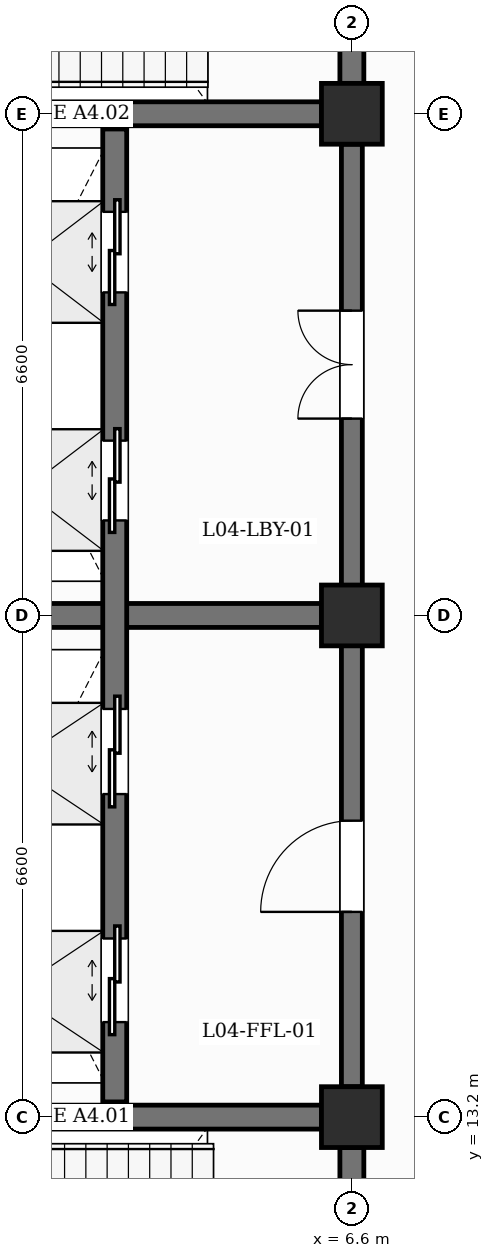
"""IFC4 building model, lengths in metres.
Left out: names, types, materials, properties, quantities, classifications, styles, units other than length and angle.
Written with IfcOpenShell. Run it as: python <this file> out.ifc"""

import sys

from ifc_helpers import new_model, si_unit, direction, frame, frame_2d, origin, origin_2d, place, context, subcontext, project, spatial, rectangle, extrude, element, fill, save


model = new_model("IFC4")
c1 = context("Model", 3, precision=1e-05, world=origin(), true_north=direction((0.0, 1.0)))
c2 = subcontext(c1, "Body", "Model", "MODEL_VIEW")
j1 = project(units=[si_unit("LENGTHUNIT", "METRE"), si_unit("PLANEANGLEUNIT", "RADIAN")], contexts=[c1])
p1 = place(None, origin())
s1 = spatial("IfcSite", under=j1, at=p1, CompositionType="ELEMENT")
p2 = place(p1, origin())
s2 = spatial("IfcBuilding", under=s1, at=p2, CompositionType="ELEMENT")
p3 = place(p2, frame((0.0, 0.0, 18.6)))
s3 = spatial("IfcBuildingStorey", under=s2, at=p3, CompositionType="ELEMENT", Elevation=18.6)
for number, where, z_axis, x_axis in (
    (1, (6.6, 13.2, 0.0), (0.0, 0.0, 1.0), (1.0, 0.0, 0.0)),
    (2, (6.6, 19.8, 0.0), (0.0, 0.0, 1.0), (1.0, 0.0, 0.0)),
    (3, (6.6, 26.4, 0.0), (0.0, 0.0, 1.0), (1.0, 0.0, 0.0)),
):
    element("IfcColumn", number, at=place(p3, frame(where, z_axis=z_axis, x_axis=x_axis)), inside=s3, PredefinedType="COLUMN", context=c2, shape_type="SweptSolid", body=[
        extrude(rectangle(XDim=0.8, YDim=0.8, at=origin_2d()), origin(), (0.0, 0.0, 1.0), 4.2),
    ])
p4 = place(p3, frame((0.4, 13.2, 0.0), z_axis=(0.0, 0.0, 1.0), x_axis=(1.0, 0.0, 0.0)))
e4 = element("IfcWall", 4, at=p4, inside=s3, PredefinedType="SHEAR", context=c2, shape_type="SweptSolid", body=[
    extrude(rectangle(XDim=5.8, YDim=0.315, at=frame_2d((2.9, 0.0))), origin(), (0.0, 0.0, 1.0), 3.16),
])
p5 = place(p3, frame((6.6, 7.0, 0.0), z_axis=(0.0, 0.0, 1.0), x_axis=(0.0, 1.0, 0.0)))
e5 = element("IfcWall", 5, at=p5, inside=s3, PredefinedType="SHEAR", context=c2, shape_type="SweptSolid", body=[
    extrude(rectangle(XDim=5.8, YDim=0.315, at=frame_2d((2.9, 0.0))), origin(), (0.0, 0.0, 1.0), 3.16),
])
p6 = place(p5, frame((2.325, 0.0, 0.0)))
e6 = element("IfcOpeningElement", 6, at=p6, cuts=e5, PredefinedType="OPENING", context=c2, shape_type="SweptSolid", body=[
    extrude(rectangle(XDim=1.15, YDim=2.2, at=frame_2d((0.575, 1.1))), frame((0.0, 0.167, 0.0), z_axis=(0.0, -1.0, 0.0), x_axis=(1.0, 0.0, 0.0)), (0.0, 0.0, 1.0), 0.335),
])
p7 = place(p3, frame((0.4, 26.4, 0.0), z_axis=(0.0, 0.0, 1.0), x_axis=(1.0, 0.0, 0.0)))
e7 = element("IfcWall", 7, at=p7, inside=s3, PredefinedType="SHEAR", context=c2, shape_type="SweptSolid", body=[
    extrude(rectangle(XDim=5.8, YDim=0.315, at=frame_2d((2.9, 0.0))), origin(), (0.0, 0.0, 1.0), 3.16),
])
p8 = place(p3, frame((6.6, 26.8, 0.0), z_axis=(0.0, 0.0, 1.0), x_axis=(0.0, 1.0, 0.0)))
e8 = element("IfcWall", 8, at=p8, inside=s3, PredefinedType="SHEAR", context=c2, shape_type="SweptSolid", body=[
    extrude(rectangle(XDim=5.8, YDim=0.315, at=frame_2d((2.9, 0.0))), origin(), (0.0, 0.0, 1.0), 3.16),
])
p9 = place(p8, frame((2.325, 0.0, 0.0)))
e9 = element("IfcOpeningElement", 9, at=p9, cuts=e8, PredefinedType="OPENING", context=c2, shape_type="SweptSolid", body=[
    extrude(rectangle(XDim=1.15, YDim=2.2, at=frame_2d((0.575, 1.1))), frame((0.0, 0.167, 0.0), z_axis=(0.0, -1.0, 0.0), x_axis=(1.0, 0.0, 0.0)), (0.0, 0.0, 1.0), 0.335),
])
p10 = place(p3, frame((0.4, 19.8, 0.0), z_axis=(0.0, 0.0, 1.0), x_axis=(1.0, 0.0, 0.0)))
e10 = element("IfcWall", 10, at=p10, inside=s3, PredefinedType="SHEAR", context=c2, shape_type="SweptSolid", body=[
    extrude(rectangle(XDim=5.8, YDim=0.315, at=frame_2d((2.9, 0.0))), origin(), (0.0, 0.0, 1.0), 3.16),
])
p11 = place(p3, frame((6.6, 13.6, 0.0), z_axis=(0.0, 0.0, 1.0), x_axis=(0.0, 1.0, 0.0)))
e11 = element("IfcWall", 11, at=p11, inside=s3, PredefinedType="SHEAR", context=c2, shape_type="SweptSolid", body=[
    extrude(rectangle(XDim=5.8, YDim=0.275, at=frame_2d((2.9, 0.0))), origin(), (0.0, 0.0, 1.0), 3.16),
])
p12 = place(p11, frame((2.3, 0.0, 0.0)))
e12 = element("IfcOpeningElement", 12, at=p12, cuts=e11, PredefinedType="OPENING", context=c2, shape_type="SweptSolid", body=[
    extrude(rectangle(XDim=1.2, YDim=2.25, at=frame_2d((0.6, 1.125))), frame((0.0, 0.147, 0.0), z_axis=(0.0, -1.0, 0.0), x_axis=(1.0, 0.0, 0.0)), (0.0, 0.0, 1.0), 0.295),
])
p13 = place(p3, frame((6.6, 20.2, 0.0), z_axis=(0.0, 0.0, 1.0), x_axis=(0.0, 1.0, 0.0)))
e13 = element("IfcWall", 13, at=p13, inside=s3, PredefinedType="SHEAR", context=c2, shape_type="SweptSolid", body=[
    extrude(rectangle(XDim=5.8, YDim=0.275, at=frame_2d((2.9, 0.0))), origin(), (0.0, 0.0, 1.0), 3.16),
])
p14 = place(p13, frame((2.19, 0.0, 0.0)))
e14 = element("IfcOpeningElement", 14, at=p14, cuts=e13, PredefinedType="OPENING", context=c2, shape_type="SweptSolid", body=[
    extrude(rectangle(XDim=1.42, YDim=2.2, at=frame_2d((0.71, 1.1))), frame((0.0, 0.147, 0.0), z_axis=(0.0, -1.0, 0.0), x_axis=(1.0, 0.0, 0.0)), (0.0, 0.0, 1.0), 0.295),
])
p15 = place(p3, frame((3.48, 13.4, 0.0), z_axis=(0.0, 0.0, 1.0), x_axis=(0.0, 1.0, 0.0)))
e15 = element("IfcWall", 15, at=p15, inside=s3, PredefinedType="SHEAR", context=c2, shape_type="SweptSolid", body=[
    extrude(rectangle(XDim=6.2, YDim=0.315, at=frame_2d((3.1, 0.0))), origin(), (0.0, 0.0, 1.0), 3.86),
])
p16 = place(p15, frame((1.05, 0.0, 0.0)))
e16 = element("IfcOpeningElement", 16, at=p16, cuts=e15, PredefinedType="OPENING", context=c2, shape_type="SweptSolid", body=[
    extrude(rectangle(XDim=1.1, YDim=2.15, at=frame_2d((0.55, 1.075))), frame((0.0, 0.167, 0.0), z_axis=(0.0, -1.0, 0.0), x_axis=(1.0, 0.0, 0.0)), (0.0, 0.0, 1.0), 0.335),
])
p17 = place(p15, frame((4.05, 0.0, 0.0)))
e17 = element("IfcOpeningElement", 17, at=p17, cuts=e15, PredefinedType="OPENING", context=c2, shape_type="SweptSolid", body=[
    extrude(rectangle(XDim=1.12, YDim=2.15, at=frame_2d((0.56, 1.075))), frame((0.0, 0.167, 0.0), z_axis=(0.0, -1.0, 0.0), x_axis=(1.0, 0.0, 0.0)), (0.0, 0.0, 1.0), 0.335),
])
p18 = place(p3, frame((3.48, 20.0, 0.0), z_axis=(0.0, 0.0, 1.0), x_axis=(0.0, 1.0, 0.0)))
e18 = element("IfcWall", 18, at=p18, inside=s3, PredefinedType="SHEAR", context=c2, shape_type="SweptSolid", body=[
    extrude(rectangle(XDim=6.2, YDim=0.315, at=frame_2d((3.1, 0.0))), origin(), (0.0, 0.0, 1.0), 3.86),
])
p19 = place(p18, frame((1.05, 0.0, 0.0)))
e19 = element("IfcOpeningElement", 19, at=p19, cuts=e18, PredefinedType="OPENING", context=c2, shape_type="SweptSolid", body=[
    extrude(rectangle(XDim=1.05, YDim=2.15, at=frame_2d((0.525, 1.075))), frame((0.0, 0.167, 0.0), z_axis=(0.0, -1.0, 0.0), x_axis=(1.0, 0.0, 0.0)), (0.0, 0.0, 1.0), 0.335),
])
p20 = place(p18, frame((4.05, 0.0, 0.0)))
e20 = element("IfcOpeningElement", 20, at=p20, cuts=e18, PredefinedType="OPENING", context=c2, shape_type="SweptSolid", body=[
    extrude(rectangle(XDim=1.06, YDim=2.15, at=frame_2d((0.53, 1.075))), frame((0.0, 0.167, 0.0), z_axis=(0.0, -1.0, 0.0), x_axis=(1.0, 0.0, 0.0)), (0.0, 0.0, 1.0), 0.335),
])
p21 = place(p16, origin())
e21 = element("IfcDoor", 21, at=p21, inside=s3, OperationType="DOUBLE_DOOR_SLIDING", PredefinedType="USERDEFINED", context=c2, shape_type="SweptSolid", body=[
    extrude(rectangle(XDim=1.1, YDim=2.15, at=frame_2d((0.55, 1.075))), frame((0.0, 0.025, 0.0), z_axis=(0.0, -1.0, 0.0), x_axis=(1.0, 0.0, 0.0)), (0.0, 0.0, 1.0), 0.05),
])
fill(e16, e21)
p22 = place(p17, origin())
e22 = element("IfcDoor", 22, at=p22, inside=s3, OperationType="DOUBLE_DOOR_SLIDING", PredefinedType="USERDEFINED", context=c2, shape_type="SweptSolid", body=[
    extrude(rectangle(XDim=1.12, YDim=2.15, at=frame_2d((0.56, 1.075))), frame((0.0, 0.025, 0.0), z_axis=(0.0, -1.0, 0.0), x_axis=(1.0, 0.0, 0.0)), (0.0, 0.0, 1.0), 0.05),
])
fill(e17, e22)
p23 = place(p19, origin())
e23 = element("IfcDoor", 23, at=p23, inside=s3, OperationType="DOUBLE_DOOR_SLIDING", PredefinedType="USERDEFINED", context=c2, shape_type="SweptSolid", body=[
    extrude(rectangle(XDim=1.05, YDim=2.15, at=frame_2d((0.525, 1.075))), frame((0.0, 0.025, 0.0), z_axis=(0.0, -1.0, 0.0), x_axis=(1.0, 0.0, 0.0)), (0.0, 0.0, 1.0), 0.05),
])
fill(e19, e23)
p24 = place(p20, origin())
e24 = element("IfcDoor", 24, at=p24, inside=s3, OperationType="DOUBLE_DOOR_SLIDING", PredefinedType="USERDEFINED", context=c2, shape_type="SweptSolid", body=[
    extrude(rectangle(XDim=1.06, YDim=2.15, at=frame_2d((0.53, 1.075))), frame((0.0, 0.025, 0.0), z_axis=(0.0, -1.0, 0.0), x_axis=(1.0, 0.0, 0.0)), (0.0, 0.0, 1.0), 0.05),
])
fill(e20, e24)
p25 = place(p12, origin())
e25 = element("IfcDoor", 25, at=p25, inside=s3, OperationType="SINGLE_SWING_LEFT", PredefinedType="DOOR", context=c2, shape_type="SweptSolid", body=[
    extrude(rectangle(XDim=1.2, YDim=2.25, at=frame_2d((0.6, 1.125))), frame((0.0, 0.025, 0.0), z_axis=(0.0, -1.0, 0.0), x_axis=(1.0, 0.0, 0.0)), (0.0, 0.0, 1.0), 0.05),
])
fill(e12, e25)
p26 = place(p14, origin())
e26 = element("IfcDoor", 26, at=p26, inside=s3, OperationType="DOUBLE_DOOR_SINGLE_SWING", PredefinedType="DOOR", context=c2, shape_type="SweptSolid", body=[
    extrude(rectangle(XDim=1.42, YDim=2.2, at=frame_2d((0.71, 1.1))), frame((0.0, 0.025, 0.0), z_axis=(0.0, -1.0, 0.0), x_axis=(1.0, 0.0, 0.0)), (0.0, 0.0, 1.0), 0.05),
])
fill(e14, e26)
save(model, sys.argv[1])
